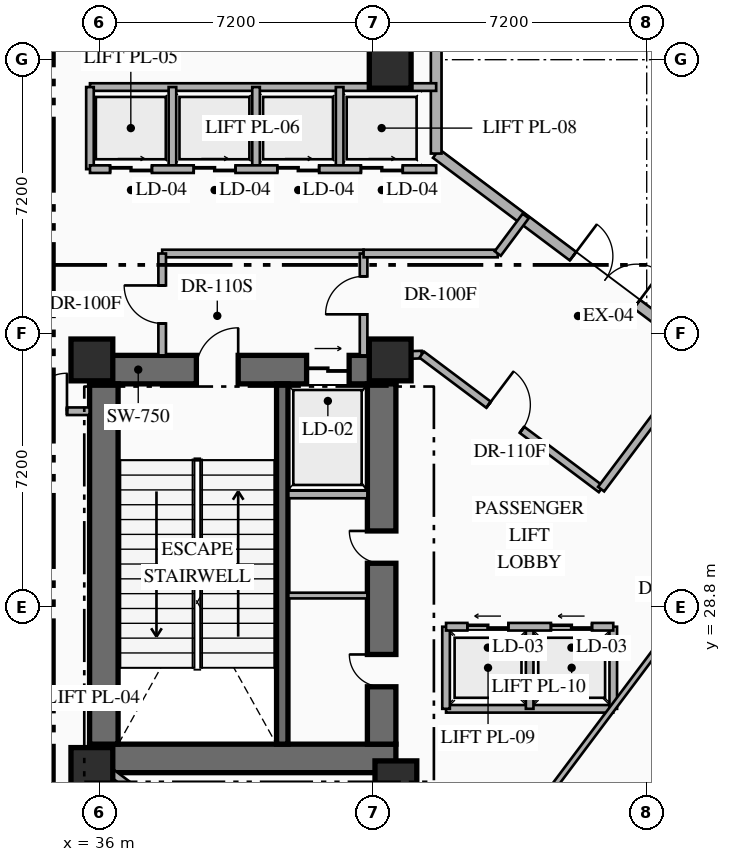
"""IFC4 building model, lengths in metres.
Left out: names, types, materials, properties, quantities, classifications, styles, units other than length and angle.
Written with IfcOpenShell. Run it as: python <this file> out.ifc"""

import sys

from ifc_helpers import new_model, si_unit, direction, frame, frame_2d, origin, origin_2d, place, context, subcontext, project, spatial, rectangle, extrude, element, fill, save


model = new_model("IFC4")
c1 = context("Model", 3, precision=1e-05, world=origin(), true_north=direction((0.0, 1.0)))
c2 = subcontext(c1, "Body", "Model", "MODEL_VIEW")
j1 = project(units=[si_unit("LENGTHUNIT", "METRE"), si_unit("PLANEANGLEUNIT", "RADIAN")], contexts=[c1])
p1 = place(None, origin())
s1 = spatial("IfcSite", under=j1, at=p1, CompositionType="ELEMENT")
p2 = place(p1, origin())
s2 = spatial("IfcBuilding", under=s1, at=p2, CompositionType="ELEMENT")
p3 = place(p2, origin())
s3 = spatial("IfcBuildingStorey", under=s2, at=p3, CompositionType="ELEMENT", Elevation=0.0)
p4 = place(p3, frame((35.74, 24.815, 0.0), z_axis=(0.0, 0.0, 1.0), x_axis=(1.0, 0.0, 0.0)))
e1 = element("IfcWall", 1, at=p4, inside=s3, PredefinedType="SHEAR", context=c2, shape_type="SweptSolid", body=[
    extrude(rectangle(XDim=8.06, YDim=0.75, at=frame_2d((4.03, 0.0))), origin(), (0.0, 0.0, 1.0), 5.4),
])
p5 = place(p3, frame((35.74, 35.045, 0.0), z_axis=(0.0, 0.0, 1.0), x_axis=(1.0, 0.0, 0.0)))
e2 = element("IfcWall", 2, at=p5, inside=s3, PredefinedType="SHEAR", context=c2, shape_type="SweptSolid", body=[
    extrude(rectangle(XDim=8.06, YDim=0.75, at=frame_2d((4.03, 0.0))), origin(), (0.0, 0.0, 1.0), 5.4),
])
p6 = place(p5, frame((2.81, 0.0, 0.0)))
e3 = element("IfcOpeningElement", 3, at=p6, cuts=e2, PredefinedType="OPENING", context=c2, shape_type="SweptSolid", body=[
    extrude(rectangle(XDim=1.1, YDim=2.2, at=frame_2d((0.55, 1.1))), frame((0.0, 0.385, 0.0), z_axis=(0.0, -1.0, 0.0), x_axis=(1.0, 0.0, 0.0)), (0.0, 0.0, 1.0), 0.77),
])
p7 = place(p5, frame((5.71, 0.0, 0.0)))
e4 = element("IfcOpeningElement", 4, at=p7, cuts=e2, PredefinedType="OPENING", context=c2, shape_type="SweptSolid", body=[
    extrude(rectangle(XDim=1.12, YDim=2.15, at=frame_2d((0.56, 1.075))), frame((0.0, 0.385, 0.0), z_axis=(0.0, -1.0, 0.0), x_axis=(1.0, 0.0, 0.0)), (0.0, 0.0, 1.0), 0.77),
])
p8 = place(p3, frame((36.115, 25.19, 0.0), z_axis=(0.0, 0.0, 1.0), x_axis=(0.0, 1.0, 0.0)))
e5 = element("IfcWall", 5, at=p8, inside=s3, PredefinedType="SHEAR", context=c2, shape_type="SweptSolid", body=[
    extrude(rectangle(XDim=9.48, YDim=0.75, at=frame_2d((4.74, 0.0))), origin(), (0.0, 0.0, 1.0), 5.4),
])
p9 = place(p3, frame((43.425, 25.19, 0.0), z_axis=(0.0, 0.0, 1.0), x_axis=(0.0, 1.0, 0.0)))
e6 = element("IfcWall", 6, at=p9, inside=s3, PredefinedType="SHEAR", context=c2, shape_type="SweptSolid", body=[
    extrude(rectangle(XDim=9.48, YDim=0.75, at=frame_2d((4.74, 0.0))), origin(), (0.0, 0.0, 1.0), 5.4),
])
p10 = place(p9, frame((1.51, 0.0, 0.0)))
e7 = element("IfcOpeningElement", 7, at=p10, cuts=e6, PredefinedType="OPENING", context=c2, shape_type="SweptSolid", body=[
    extrude(rectangle(XDim=0.85, YDim=2.08, at=frame_2d((0.425, 1.04))), frame((0.0, 0.385, 0.0), z_axis=(0.0, -1.0, 0.0), x_axis=(1.0, 0.0, 0.0)), (0.0, 0.0, 1.0), 0.77),
])
p11 = place(p9, frame((4.76, 0.0, 0.0)))
e8 = element("IfcOpeningElement", 8, at=p11, cuts=e6, PredefinedType="OPENING", context=c2, shape_type="SweptSolid", body=[
    extrude(rectangle(XDim=0.85, YDim=2.08, at=frame_2d((0.425, 1.04))), frame((0.0, 0.385, 0.0), z_axis=(0.0, -1.0, 0.0), x_axis=(1.0, 0.0, 0.0)), (0.0, 0.0, 1.0), 0.77),
])
p12 = place(p3, frame((40.81, 25.19, 0.0), z_axis=(0.0, 0.0, 1.0), x_axis=(0.0, 1.0, 0.0)))
e9 = element("IfcWall", 9, at=p12, inside=s3, PredefinedType="SHEAR", context=c2, shape_type="SweptSolid", body=[
    extrude(rectangle(XDim=9.48, YDim=0.3, at=frame_2d((4.74, 0.0))), origin(), (0.0, 0.0, 1.0), 5.4),
])
for number, where, z_axis, x_axis in (
    (10, (35.8, 24.55, 0.0), (0.0, 0.0, 1.0), (1.0, 0.0, 0.0)),
    (11, (43.8, 24.2, 0.0), (0.0, 0.0, 1.0), (1.0, 0.0, 0.0)),
    (12, (35.8, 35.3, 0.0), (0.0, 0.0, 1.0), (1.0, 0.0, 0.0)),
    (13, (43.65, 35.3, 0.0), (0.0, 0.0, 1.0), (1.0, 0.0, 0.0)),
    (14, (43.65, 43.0, 0.0), (0.0, 0.0, 1.0), (1.0, 0.0, 0.0)),
):
    element("IfcColumn", number, at=place(p3, frame(where, z_axis=z_axis, x_axis=x_axis)), inside=s3, PredefinedType="COLUMN", context=c2, shape_type="SweptSolid", body=[
        extrude(rectangle(XDim=1.1, YDim=1.1, at=origin_2d()), origin(), (0.0, 0.0, 1.0), 5.4),
    ])
p13 = place(p3, frame((44.86, 40.73, 0.0), z_axis=(0.0, 0.0, 1.0), x_axis=(0.800006570398, -0.599991239369, 0.0)))
e15 = element("IfcWall", 15, at=p13, inside=s3, PredefinedType="STANDARD", context=c2, shape_type="SweptSolid", body=[
    extrude(rectangle(XDim=31.212, YDim=0.28, at=frame_2d((15.606, 0.0))), origin(), (0.0, 0.0, 1.0), 5.1),
])
p14 = place(p13, frame((4.5, 0.0, 0.0)))
e16 = element("IfcOpeningElement", 16, at=p14, cuts=e15, PredefinedType="OPENING", context=c2, shape_type="SweptSolid", body=[
    extrude(rectangle(XDim=2.1, YDim=2.3, at=frame_2d((1.05, 1.15))), frame((0.0, 0.15, 0.0), z_axis=(0.0, -1.0, 0.0), x_axis=(1.0, 0.0, 0.0)), (0.0, 0.0, 1.0), 0.3),
])
p15 = place(p13, frame((13.932, 0.0, 0.0)))
e17 = element("IfcOpeningElement", 17, at=p15, cuts=e15, PredefinedType="OPENING", context=c2, shape_type="SweptSolid", body=[
    extrude(rectangle(XDim=2.1, YDim=2.3, at=frame_2d((1.05, 1.15))), frame((0.0, 0.15, 0.0), z_axis=(0.0, -1.0, 0.0), x_axis=(1.0, 0.0, 0.0)), (0.0, 0.0, 1.0), 0.3),
])
p16 = place(p13, frame((21.423, 0.0, 0.0)))
e18 = element("IfcOpeningElement", 18, at=p16, cuts=e15, PredefinedType="OPENING", context=c2, shape_type="SweptSolid", body=[
    extrude(rectangle(XDim=2.1, YDim=2.3, at=frame_2d((1.05, 1.15))), frame((0.0, 0.15, 0.0), z_axis=(0.0, -1.0, 0.0), x_axis=(1.0, 0.0, 0.0)), (0.0, 0.0, 1.0), 0.3),
])
p17 = place(p13, frame((25.168, 0.0, 0.0)))
e19 = element("IfcOpeningElement", 19, at=p17, cuts=e15, PredefinedType="OPENING", context=c2, shape_type="SweptSolid", body=[
    extrude(rectangle(XDim=2.1, YDim=2.3, at=frame_2d((1.05, 1.15))), frame((0.0, 0.15, 0.0), z_axis=(0.0, -1.0, 0.0), x_axis=(1.0, 0.0, 0.0)), (0.0, 0.0, 1.0), 0.3),
])
p18 = place(p3, frame((44.86, 49.142, 0.0), z_axis=(0.0, 0.0, 1.0), x_axis=(0.0, -1.0, 0.0)))
e20 = element("IfcWall", 20, at=p18, inside=s3, PredefinedType="STANDARD", context=c2, shape_type="SweptSolid", body=[
    extrude(rectangle(XDim=8.412, YDim=0.28, at=frame_2d((4.206, 0.0))), origin(), (0.0, 0.0, 1.0), 5.1),
])
p19 = place(p3, frame((40.97, 31.76, 0.0), z_axis=(0.0, 0.0, 1.0), x_axis=(1.0, 0.0, 0.0)))
e21 = element("IfcWall", 21, at=p19, inside=s3, PredefinedType="STANDARD", context=c2, shape_type="SweptSolid", body=[
    extrude(rectangle(XDim=2.08, YDim=0.2, at=frame_2d((1.04, 0.0))), origin(), (0.0, 0.0, 1.0), 5.1),
])
p20 = place(p3, frame((40.97, 29.1, 0.0), z_axis=(0.0, 0.0, 1.0), x_axis=(1.0, 0.0, 0.0)))
e22 = element("IfcWall", 22, at=p20, inside=s3, PredefinedType="PARTITIONING", context=c2, shape_type="SweptSolid", body=[
    extrude(rectangle(XDim=2.08, YDim=0.15, at=frame_2d((1.04, 0.0))), origin(), (0.0, 0.0, 1.0), 5.1),
])
p21 = place(p3, frame((37.65, 38.1, 0.0), z_axis=(0.0, 0.0, 1.0), x_axis=(1.0, 0.0, 0.0)))
e23 = element("IfcWall", 23, at=p21, inside=s3, PredefinedType="STANDARD", context=c2, shape_type="SweptSolid", body=[
    extrude(rectangle(XDim=5.3, YDim=0.2, at=frame_2d((2.65, 0.0))), origin(), (0.0, 0.0, 1.0), 5.1),
])
p22 = place(p3, frame((42.95, 35.42, 0.0), z_axis=(0.0, 0.0, 1.0), x_axis=(0.0, 1.0, 0.0)))
e24 = element("IfcWall", 24, at=p22, inside=s3, PredefinedType="STANDARD", context=c2, shape_type="SweptSolid", body=[
    extrude(rectangle(XDim=2.68, YDim=0.2, at=frame_2d((1.34, 0.0))), origin(), (0.0, 0.0, 1.0), 5.1),
])
p23 = place(p22, frame((1.08, 0.0, 0.0)))
e25 = element("IfcOpeningElement", 25, at=p23, cuts=e24, PredefinedType="OPENING", context=c2, shape_type="SweptSolid", body=[
    extrude(rectangle(XDim=1.0, YDim=2.2, at=frame_2d((0.5, 1.1))), frame((0.0, 0.11, 0.0), z_axis=(0.0, -1.0, 0.0), x_axis=(1.0, 0.0, 0.0)), (0.0, 0.0, 1.0), 0.22),
])
p24 = place(p3, frame((37.65, 35.42, 0.0), z_axis=(0.0, 0.0, 1.0), x_axis=(0.0, 1.0, 0.0)))
e26 = element("IfcWall", 26, at=p24, inside=s3, PredefinedType="STANDARD", context=c2, shape_type="SweptSolid", body=[
    extrude(rectangle(XDim=2.68, YDim=0.2, at=frame_2d((1.34, 0.0))), origin(), (0.0, 0.0, 1.0), 5.1),
])
p25 = place(p24, frame((0.84, 0.0, 0.0)))
e27 = element("IfcOpeningElement", 27, at=p25, cuts=e26, PredefinedType="OPENING", context=c2, shape_type="SweptSolid", body=[
    extrude(rectangle(XDim=1.0, YDim=2.2, at=frame_2d((0.5, 1.1))), frame((0.0, 0.11, 0.0), z_axis=(0.0, -1.0, 0.0), x_axis=(1.0, 0.0, 0.0)), (0.0, 0.0, 1.0), 0.22),
])
p26 = place(p3, frame((35.75, 42.48, 0.0), z_axis=(0.0, 0.0, 1.0), x_axis=(1.0, 0.0, 0.0)))
e28 = element("IfcWall", 28, at=p26, inside=s3, PredefinedType="STANDARD", context=c2, shape_type="SweptSolid", body=[
    extrude(rectangle(XDim=9.11, YDim=0.2, at=frame_2d((4.555, 0.0))), origin(), (0.0, 0.0, 1.0), 5.1),
])
for number, where, z_axis, x_axis in (
    (29, (35.75, 40.32, 0.0), (0.0, 0.0, 1.0), (0.0, 1.0, 0.0)),
    (30, (37.92, 40.32, 0.0), (0.0, 0.0, 1.0), (0.0, 1.0, 0.0)),
    (31, (40.12, 40.32, 0.0), (0.0, 0.0, 1.0), (0.0, 1.0, 0.0)),
    (32, (42.32, 40.32, 0.0), (0.0, 0.0, 1.0), (0.0, 1.0, 0.0)),
):
    element("IfcWall", number, at=place(p3, frame(where, z_axis=z_axis, x_axis=x_axis)), inside=s3, PredefinedType="STANDARD", context=c2, shape_type="SweptSolid", body=[
        extrude(rectangle(XDim=2.16, YDim=0.2, at=frame_2d((1.08, 0.0))), origin(), (0.0, 0.0, 1.0), 5.1),
    ])
p27 = place(p3, frame((35.75, 40.32, 0.0), z_axis=(0.0, 0.0, 1.0), x_axis=(1.0, 0.0, 0.0)))
e33 = element("IfcWall", 33, at=p27, inside=s3, PredefinedType="STANDARD", context=c2, shape_type="SweptSolid", body=[
    extrude(rectangle(XDim=9.11, YDim=0.2, at=frame_2d((4.555, 0.0))), origin(), (0.0, 0.0, 1.0), 5.1),
])
p28 = place(p27, frame((0.53, 0.0, 0.0)))
e34 = element("IfcOpeningElement", 34, at=p28, cuts=e33, PredefinedType="OPENING", context=c2, shape_type="SweptSolid", body=[
    extrude(rectangle(XDim=1.1, YDim=2.18, at=frame_2d((0.55, 1.09))), frame((0.0, 0.11, 0.0), z_axis=(0.0, -1.0, 0.0), x_axis=(1.0, 0.0, 0.0)), (0.0, 0.0, 1.0), 0.22),
])
p29 = place(p27, frame((2.73, 0.0, 0.0)))
e35 = element("IfcOpeningElement", 35, at=p29, cuts=e33, PredefinedType="OPENING", context=c2, shape_type="SweptSolid", body=[
    extrude(rectangle(XDim=1.1, YDim=2.18, at=frame_2d((0.55, 1.09))), frame((0.0, 0.11, 0.0), z_axis=(0.0, -1.0, 0.0), x_axis=(1.0, 0.0, 0.0)), (0.0, 0.0, 1.0), 0.22),
])
p30 = place(p27, frame((4.93, 0.0, 0.0)))
e36 = element("IfcOpeningElement", 36, at=p30, cuts=e33, PredefinedType="OPENING", context=c2, shape_type="SweptSolid", body=[
    extrude(rectangle(XDim=1.1, YDim=2.18, at=frame_2d((0.55, 1.09))), frame((0.0, 0.11, 0.0), z_axis=(0.0, -1.0, 0.0), x_axis=(1.0, 0.0, 0.0)), (0.0, 0.0, 1.0), 0.22),
])
p31 = place(p27, frame((7.13, 0.0, 0.0)))
e37 = element("IfcOpeningElement", 37, at=p31, cuts=e33, PredefinedType="OPENING", context=c2, shape_type="SweptSolid", body=[
    extrude(rectangle(XDim=1.1, YDim=2.18, at=frame_2d((0.55, 1.09))), frame((0.0, 0.11, 0.0), z_axis=(0.0, -1.0, 0.0), x_axis=(1.0, 0.0, 0.0)), (0.0, 0.0, 1.0), 0.22),
])
p32 = place(p3, frame((45.12, 26.12, 0.0), z_axis=(0.0, 0.0, 1.0), x_axis=(1.0, 0.0, 0.0)))
e38 = element("IfcWall", 38, at=p32, inside=s3, PredefinedType="STANDARD", context=c2, shape_type="SweptSolid", body=[
    extrude(rectangle(XDim=4.4, YDim=0.2, at=frame_2d((2.2, 0.0))), origin(), (0.0, 0.0, 1.0), 5.1),
])
for number, where, z_axis, x_axis in (
    (39, (45.12, 26.12, 0.0), (0.0, 0.0, 1.0), (0.0, 1.0, 0.0)),
    (40, (49.52, 26.12, 0.0), (0.0, 0.0, 1.0), (0.0, 1.0, 0.0)),
    (41, (47.32, 26.12, 0.0), (0.0, 0.0, 1.0), (0.0, 1.0, 0.0)),
):
    element("IfcWall", number, at=place(p3, frame(where, z_axis=z_axis, x_axis=x_axis)), inside=s3, PredefinedType="STANDARD", context=c2, shape_type="SweptSolid", body=[
        extrude(rectangle(XDim=2.16, YDim=0.2, at=frame_2d((1.08, 0.0))), origin(), (0.0, 0.0, 1.0), 5.1),
    ])
p33 = place(p3, frame((45.12, 28.28, 0.0), z_axis=(0.0, 0.0, 1.0), x_axis=(1.0, 0.0, 0.0)))
e42 = element("IfcWall", 42, at=p33, inside=s3, PredefinedType="STANDARD", context=c2, shape_type="SweptSolid", body=[
    extrude(rectangle(XDim=4.4, YDim=0.2, at=frame_2d((2.2, 0.0))), origin(), (0.0, 0.0, 1.0), 5.1),
])
p34 = place(p33, frame((0.56, 0.0, 0.0)))
e43 = element("IfcOpeningElement", 43, at=p34, cuts=e42, PredefinedType="OPENING", context=c2, shape_type="SweptSolid", body=[
    extrude(rectangle(XDim=1.08, YDim=2.15, at=frame_2d((0.54, 1.075))), frame((0.0, 0.11, 0.0), z_axis=(0.0, -1.0, 0.0), x_axis=(1.0, 0.0, 0.0)), (0.0, 0.0, 1.0), 0.22),
])
p35 = place(p33, frame((2.76, 0.0, 0.0)))
e44 = element("IfcOpeningElement", 44, at=p35, cuts=e42, PredefinedType="OPENING", context=c2, shape_type="SweptSolid", body=[
    extrude(rectangle(XDim=1.08, YDim=2.15, at=frame_2d((0.54, 1.075))), frame((0.0, 0.11, 0.0), z_axis=(0.0, -1.0, 0.0), x_axis=(1.0, 0.0, 0.0)), (0.0, 0.0, 1.0), 0.22),
])
p36 = place(p3, frame((33.55, 33.95, 0.0), z_axis=(0.0, 0.0, 1.0), x_axis=(1.0, 0.0, 0.0)))
e45 = element("IfcWall", 45, at=p36, inside=s3, PredefinedType="STANDARD", context=c2, shape_type="SweptSolid", body=[
    extrude(rectangle(XDim=2.19, YDim=0.2, at=frame_2d((1.095, 0.0))), origin(), (0.0, 0.0, 1.0), 5.1),
])
p37 = place(p36, frame((0.595, 0.0, 0.0)))
e46 = element("IfcOpeningElement", 46, at=p37, cuts=e45, PredefinedType="OPENING", context=c2, shape_type="SweptSolid", body=[
    extrude(rectangle(XDim=1.0, YDim=2.2, at=frame_2d((0.5, 1.1))), frame((0.0, 0.11, 0.0), z_axis=(0.0, -1.0, 0.0), x_axis=(1.0, 0.0, 0.0)), (0.0, 0.0, 1.0), 0.22),
])
p38 = place(p3, frame((36.287, 24.46, 0.0), z_axis=(0.0, 0.0, 1.0), x_axis=(0.799930857749, -0.600092178603, 0.0)))
e47 = element("IfcWall", 47, at=p38, inside=s3, PredefinedType="STANDARD", context=c2, shape_type="SweptSolid", body=[
    extrude(rectangle(XDim=2.966, YDim=0.2, at=frame_2d((1.483, 0.0))), origin(), (0.0, 0.0, 1.0), 5.1),
])
p39 = place(p3, frame((42.95, 38.1, 0.0), z_axis=(0.0, 0.0, 1.0), x_axis=(1.0, 0.0, 0.0)))
e48 = element("IfcWall", 48, at=p39, inside=s3, PredefinedType="STANDARD", context=c2, shape_type="SweptSolid", body=[
    extrude(rectangle(XDim=3.53, YDim=0.2, at=frame_2d((1.765, 0.0))), origin(), (0.0, 0.0, 1.0), 5.1),
])
p40 = place(p3, frame((46.48, 38.1, 0.0), z_axis=(0.0, 0.0, 1.0), x_axis=(0.597523800128, 0.801851175893, 0.0)))
e49 = element("IfcWall", 49, at=p40, inside=s3, PredefinedType="STANDARD", context=c2, shape_type="SweptSolid", body=[
    extrude(rectangle(XDim=1.232, YDim=0.2, at=frame_2d((0.616, 0.0))), origin(), (0.0, 0.0, 1.0), 5.1),
])
p41 = place(p3, frame((43.8, 35.42, 0.0), z_axis=(0.0, 0.0, 1.0), x_axis=(0.999566823339, 0.029430692824, 0.0)))
e50 = element("IfcWall", 50, at=p41, inside=s3, PredefinedType="STANDARD", context=c2, shape_type="SweptSolid", body=[
    extrude(rectangle(XDim=0.68, YDim=0.2, at=frame_2d((0.34, 0.0))), origin(), (0.0, 0.0, 1.0), 5.1),
])
p42 = place(p3, frame((44.48, 35.44, 0.0), z_axis=(0.0, 0.0, 1.0), x_axis=(0.799995034401, -0.600006620742, 0.0)))
e51 = element("IfcWall", 51, at=p42, inside=s3, PredefinedType="STANDARD", context=c2, shape_type="SweptSolid", body=[
    extrude(rectangle(XDim=5.9, YDim=0.2, at=frame_2d((2.95, 0.0))), origin(), (0.0, 0.0, 1.0), 4.495),
])
p43 = place(p42, frame((2.198, 0.0, 0.0)))
e52 = element("IfcOpeningElement", 52, at=p43, cuts=e51, PredefinedType="OPENING", context=c2, shape_type="SweptSolid", body=[
    extrude(rectangle(XDim=1.1, YDim=2.24, at=frame_2d((0.55, 1.12))), frame((0.0, 0.11, 0.0), z_axis=(0.0, -1.0, 0.0), x_axis=(1.0, 0.0, 0.0)), (0.0, 0.0, 1.0), 0.22),
])
p44 = place(p3, frame((49.2, 31.9, 0.0), z_axis=(0.0, 0.0, 1.0), x_axis=(0.599991434013, 0.800006424419, 0.0)))
e53 = element("IfcWall", 53, at=p44, inside=s3, PredefinedType="STANDARD", context=c2, shape_type="SweptSolid", body=[
    extrude(rectangle(XDim=4.56, YDim=0.2, at=frame_2d((2.28, 0.0))), origin(), (0.0, 0.0, 1.0), 5.1),
])
p45 = place(p3, frame((47.12, 22.96, 0.0), z_axis=(0.0, 0.0, 1.0), x_axis=(0.599996985882, 0.80000226058, 0.0)))
e54 = element("IfcWall", 54, at=p45, inside=s3, PredefinedType="PARTITIONING", context=c2, shape_type="SweptSolid", body=[
    extrude(rectangle(XDim=12.96, YDim=0.15, at=frame_2d((6.48, 0.0))), origin(), (0.0, 0.0, 1.0), 5.1),
])
p46 = place(p45, frame((6.485, 0.0, 0.0)))
e55 = element("IfcOpeningElement", 55, at=p46, cuts=e54, PredefinedType="OPENING", context=c2, shape_type="SweptSolid", body=[
    extrude(rectangle(XDim=1.1, YDim=2.16, at=frame_2d((0.55, 1.08))), frame((0.0, 0.085, 0.0), z_axis=(0.0, -1.0, 0.0), x_axis=(1.0, 0.0, 0.0)), (0.0, 0.0, 1.0), 0.17),
])
p47 = place(p14, origin())
e56 = element("IfcDoor", 56, at=p47, inside=s3, OperationType="DOUBLE_SWING_LEFT", PredefinedType="DOOR", context=c2, shape_type="SweptSolid", body=[
    extrude(rectangle(XDim=2.1, YDim=2.3, at=frame_2d((1.05, 1.15))), frame((0.0, 0.025, 0.0), z_axis=(0.0, -1.0, 0.0), x_axis=(1.0, 0.0, 0.0)), (0.0, 0.0, 1.0), 0.05),
])
fill(e16, e56)
p48 = place(p6, origin())
e57 = element("IfcDoor", 57, at=p48, inside=s3, OperationType="SINGLE_SWING_RIGHT", PredefinedType="DOOR", context=c2, shape_type="SweptSolid", body=[
    extrude(rectangle(XDim=1.1, YDim=2.2, at=frame_2d((0.55, 1.1))), frame((0.0, 0.025, 0.0), z_axis=(0.0, -1.0, 0.0), x_axis=(1.0, 0.0, 0.0)), (0.0, 0.0, 1.0), 0.05),
])
fill(e3, e57)
p49 = place(p7, origin())
e58 = element("IfcDoor", 58, at=p49, inside=s3, OperationType="SLIDING_TO_RIGHT", PredefinedType="USERDEFINED", context=c2, shape_type="SweptSolid", body=[
    extrude(rectangle(XDim=1.12, YDim=2.15, at=frame_2d((0.56, 1.075))), frame((0.0, 0.025, 0.0), z_axis=(0.0, -1.0, 0.0), x_axis=(1.0, 0.0, 0.0)), (0.0, 0.0, 1.0), 0.05),
])
fill(e4, e58)
p50 = place(p10, origin())
e59 = element("IfcDoor", 59, at=p50, inside=s3, OperationType="SINGLE_SWING_RIGHT", PredefinedType="DOOR", context=c2, shape_type="SweptSolid", body=[
    extrude(rectangle(XDim=0.85, YDim=2.08, at=frame_2d((0.425, 1.04))), frame((0.0, 0.025, 0.0), z_axis=(0.0, -1.0, 0.0), x_axis=(1.0, 0.0, 0.0)), (0.0, 0.0, 1.0), 0.05),
])
fill(e7, e59)
p51 = place(p11, origin())
e60 = element("IfcDoor", 60, at=p51, inside=s3, OperationType="SINGLE_SWING_RIGHT", PredefinedType="DOOR", context=c2, shape_type="SweptSolid", body=[
    extrude(rectangle(XDim=0.85, YDim=2.08, at=frame_2d((0.425, 1.04))), frame((0.0, 0.025, 0.0), z_axis=(0.0, -1.0, 0.0), x_axis=(1.0, 0.0, 0.0)), (0.0, 0.0, 1.0), 0.05),
])
fill(e8, e60)
p52 = place(p23, origin())
e61 = element("IfcDoor", 61, at=p52, inside=s3, OperationType="SINGLE_SWING_LEFT", PredefinedType="DOOR", context=c2, shape_type="SweptSolid", body=[
    extrude(rectangle(XDim=1.0, YDim=2.2, at=frame_2d((0.5, 1.1))), frame((0.0, 0.025, 0.0), z_axis=(0.0, -1.0, 0.0), x_axis=(1.0, 0.0, 0.0)), (0.0, 0.0, 1.0), 0.05),
])
fill(e25, e61)
p53 = place(p25, origin())
e62 = element("IfcDoor", 62, at=p53, inside=s3, OperationType="SINGLE_SWING_RIGHT", PredefinedType="DOOR", context=c2, shape_type="SweptSolid", body=[
    extrude(rectangle(XDim=1.0, YDim=2.2, at=frame_2d((0.5, 1.1))), frame((0.0, 0.025, 0.0), z_axis=(0.0, -1.0, 0.0), x_axis=(1.0, 0.0, 0.0)), (0.0, 0.0, 1.0), 0.05),
])
fill(e27, e62)
p54 = place(p28, origin())
e63 = element("IfcDoor", 63, at=p54, inside=s3, OperationType="SLIDING_TO_RIGHT", PredefinedType="USERDEFINED", context=c2, shape_type="SweptSolid", body=[
    extrude(rectangle(XDim=1.1, YDim=2.18, at=frame_2d((0.55, 1.09))), frame((0.0, 0.025, 0.0), z_axis=(0.0, -1.0, 0.0), x_axis=(1.0, 0.0, 0.0)), (0.0, 0.0, 1.0), 0.05),
])
fill(e34, e63)
p55 = place(p29, origin())
e64 = element("IfcDoor", 64, at=p55, inside=s3, OperationType="SLIDING_TO_RIGHT", PredefinedType="USERDEFINED", context=c2, shape_type="SweptSolid", body=[
    extrude(rectangle(XDim=1.1, YDim=2.18, at=frame_2d((0.55, 1.09))), frame((0.0, 0.025, 0.0), z_axis=(0.0, -1.0, 0.0), x_axis=(1.0, 0.0, 0.0)), (0.0, 0.0, 1.0), 0.05),
])
fill(e35, e64)
p56 = place(p30, origin())
e65 = element("IfcDoor", 65, at=p56, inside=s3, OperationType="SLIDING_TO_RIGHT", PredefinedType="USERDEFINED", context=c2, shape_type="SweptSolid", body=[
    extrude(rectangle(XDim=1.1, YDim=2.18, at=frame_2d((0.55, 1.09))), frame((0.0, 0.025, 0.0), z_axis=(0.0, -1.0, 0.0), x_axis=(1.0, 0.0, 0.0)), (0.0, 0.0, 1.0), 0.05),
])
fill(e36, e65)
p57 = place(p31, origin())
e66 = element("IfcDoor", 66, at=p57, inside=s3, OperationType="SLIDING_TO_RIGHT", PredefinedType="USERDEFINED", context=c2, shape_type="SweptSolid", body=[
    extrude(rectangle(XDim=1.1, YDim=2.18, at=frame_2d((0.55, 1.09))), frame((0.0, 0.025, 0.0), z_axis=(0.0, -1.0, 0.0), x_axis=(1.0, 0.0, 0.0)), (0.0, 0.0, 1.0), 0.05),
])
fill(e37, e66)
p58 = place(p34, origin())
e67 = element("IfcDoor", 67, at=p58, inside=s3, OperationType="SLIDING_TO_LEFT", PredefinedType="USERDEFINED", context=c2, shape_type="SweptSolid", body=[
    extrude(rectangle(XDim=1.08, YDim=2.15, at=frame_2d((0.54, 1.075))), frame((0.0, 0.025, 0.0), z_axis=(0.0, -1.0, 0.0), x_axis=(1.0, 0.0, 0.0)), (0.0, 0.0, 1.0), 0.05),
])
fill(e43, e67)
p59 = place(p35, origin())
e68 = element("IfcDoor", 68, at=p59, inside=s3, OperationType="SLIDING_TO_LEFT", PredefinedType="USERDEFINED", context=c2, shape_type="SweptSolid", body=[
    extrude(rectangle(XDim=1.08, YDim=2.15, at=frame_2d((0.54, 1.075))), frame((0.0, 0.025, 0.0), z_axis=(0.0, -1.0, 0.0), x_axis=(1.0, 0.0, 0.0)), (0.0, 0.0, 1.0), 0.05),
])
fill(e44, e68)
p60 = place(p37, origin())
e69 = element("IfcDoor", 69, at=p60, inside=s3, OperationType="SINGLE_SWING_RIGHT", PredefinedType="DOOR", context=c2, shape_type="SweptSolid", body=[
    extrude(rectangle(XDim=1.0, YDim=2.2, at=frame_2d((0.5, 1.1))), frame((0.0, 0.025, 0.0), z_axis=(0.0, -1.0, 0.0), x_axis=(1.0, 0.0, 0.0)), (0.0, 0.0, 1.0), 0.05),
])
fill(e46, e69)
p61 = place(p43, origin())
e70 = element("IfcDoor", 70, at=p61, inside=s3, OperationType="SINGLE_SWING_LEFT", PredefinedType="DOOR", context=c2, shape_type="SweptSolid", body=[
    extrude(rectangle(XDim=1.1, YDim=2.24, at=frame_2d((0.55, 1.12))), frame((0.0, 0.025, 0.0), z_axis=(0.0, -1.0, 0.0), x_axis=(1.0, 0.0, 0.0)), (0.0, 0.0, 1.0), 0.05),
])
fill(e52, e70)
save(model, sys.argv[1])
